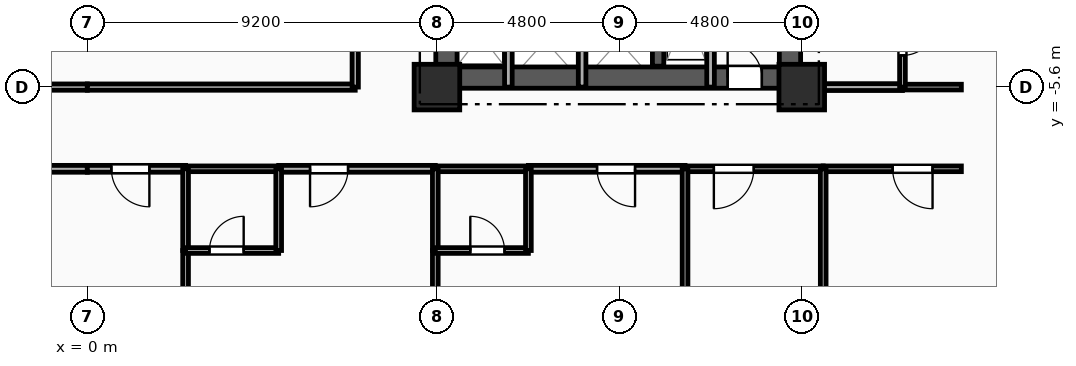
"""IFC4 building model, lengths in metres.
Left out: names, types, materials, properties, quantities, classifications, styles, units other than length and angle.
Written with IfcOpenShell. Run it as: python <this file> out.ifc"""

import sys

from ifc_helpers import new_model, si_unit, direction, frame, frame_2d, origin, origin_2d, place, context, subcontext, project, spatial, rectangle, extrude, element, fill, save


model = new_model("IFC4")
c1 = context("Model", 3, precision=1e-05, world=origin(), true_north=direction((0.0, 1.0)))
c2 = subcontext(c1, "Body", "Model", "MODEL_VIEW")
j1 = project(units=[si_unit("LENGTHUNIT", "METRE"), si_unit("PLANEANGLEUNIT", "RADIAN")], contexts=[c1])
p1 = place(None, origin())
s1 = spatial("IfcSite", under=j1, at=p1, CompositionType="ELEMENT")
p2 = place(p1, origin())
s2 = spatial("IfcBuilding", under=s1, at=p2, CompositionType="ELEMENT")
p3 = place(p2, frame((0.0, 0.0, 60.5)))
s3 = spatial("IfcBuildingStorey", under=s2, at=p3, CompositionType="ELEMENT", Elevation=60.5)
for number, where, z_axis, x_axis in (
    (1, (9.2, -5.6, 0.0), (0.0, 0.0, 1.0), (1.0, 0.0, 0.0)),
    (2, (18.8, -5.6, 0.0), (0.0, 0.0, 1.0), (1.0, 0.0, 0.0)),
):
    element("IfcColumn", number, at=place(p3, frame(where, z_axis=z_axis, x_axis=x_axis)), inside=s3, PredefinedType="COLUMN", context=c2, shape_type="SweptSolid", body=[
        extrude(rectangle(XDim=1.2, YDim=1.2, at=origin_2d()), origin(), (0.0, 0.0, 1.0), 3.35),
    ])
p4 = place(p3, frame((9.2, -5.35, 0.0), z_axis=(0.0, 0.0, 1.0), x_axis=(1.0, 0.0, 0.0)))
e3 = element("IfcWall", 3, at=p4, inside=s3, PredefinedType="SHEAR", context=c2, shape_type="SweptSolid", body=[
    extrude(rectangle(XDim=9.6, YDim=0.56, at=frame_2d((4.8, 0.0))), origin(), (0.0, 0.0, 1.0), 3.035),
])
p5 = place(p4, frame((7.65, 0.0, 0.0)))
e4 = element("IfcOpeningElement", 4, at=p5, cuts=e3, PredefinedType="OPENING", context=c2, shape_type="SweptSolid", body=[
    extrude(rectangle(XDim=0.9, YDim=2.1, at=frame_2d((0.45, 1.05))), frame((0.0, 0.29, 0.0), z_axis=(0.0, -1.0, 0.0), x_axis=(1.0, 0.0, 0.0)), (0.0, 0.0, 1.0), 0.58),
])
p6 = place(p3, frame((9.45, -5.05, 0.0), z_axis=(0.0, 0.0, 1.0), x_axis=(0.0, 1.0, 0.0)))
e5 = element("IfcWall", 5, at=p6, inside=s3, PredefinedType="SHEAR", context=c2, shape_type="SweptSolid", body=[
    extrude(rectangle(XDim=10.1, YDim=0.56, at=frame_2d((5.05, 0.0))), origin(), (0.0, 0.0, 1.0), 3.035),
])
p7 = place(p6, frame((7.15, 0.0, 0.0)))
e6 = element("IfcOpeningElement", 6, at=p7, cuts=e5, PredefinedType="OPENING", context=c2, shape_type="SweptSolid", body=[
    extrude(rectangle(XDim=0.9, YDim=2.1, at=frame_2d((0.45, 1.05))), frame((0.0, 0.29, 0.0), z_axis=(0.0, -1.0, 0.0), x_axis=(1.0, 0.0, 0.0)), (0.0, 0.0, 1.0), 0.58),
])
p8 = place(p6, frame((2.4, 0.0, 0.0)))
e7 = element("IfcOpeningElement", 7, at=p8, cuts=e5, PredefinedType="OPENING", context=c2, shape_type="SweptSolid", body=[
    extrude(rectangle(XDim=1.2, YDim=2.15, at=frame_2d((0.6, 1.075))), frame((0.0, 0.29, 0.0), z_axis=(0.0, -1.0, 0.0), x_axis=(1.0, 0.0, 0.0)), (0.0, 0.0, 1.0), 0.58),
])
p9 = place(p3, frame((18.49, -5.05, 0.0), z_axis=(0.0, 0.0, 1.0), x_axis=(0.0, 1.0, 0.0)))
e8 = element("IfcWall", 8, at=p9, inside=s3, PredefinedType="SHEAR", context=c2, shape_type="SweptSolid", body=[
    extrude(rectangle(XDim=10.1, YDim=0.56, at=frame_2d((5.05, 0.0))), origin(), (0.0, 0.0, 1.0), 3.035),
])
p10 = place(p3, frame((15.02, -5.05, 0.0), z_axis=(0.0, 0.0, 1.0), x_axis=(0.0, 1.0, 0.0)))
e9 = element("IfcWall", 9, at=p10, inside=s3, PredefinedType="SHEAR", context=c2, shape_type="SweptSolid", body=[
    extrude(rectangle(XDim=10.1, YDim=0.3, at=frame_2d((5.05, 0.0))), origin(), (0.0, 0.0, 1.0), 3.035),
])
p11 = place(p3, frame((16.4, -2.11, 0.0), z_axis=(0.0, 0.0, 1.0), x_axis=(0.0, -1.0, 0.0)))
e10 = element("IfcWall", 10, at=p11, inside=s3, PredefinedType="PARTITIONING", context=c2, shape_type="SweptSolid", body=[
    extrude(rectangle(XDim=3.49, YDim=0.2, at=frame_2d((1.745, 0.0))), origin(), (0.0, 0.0, 1.0), 3.035),
])
for number, where, z_axis, x_axis in (
    (11, (11.08, -5.6, 0.0), (0.0, 0.0, 1.0), (0.0, 1.0, 0.0)),
    (12, (13.02, -5.6, 0.0), (0.0, 0.0, 1.0), (0.0, 1.0, 0.0)),
):
    element("IfcWall", number, at=place(p3, frame(where, z_axis=z_axis, x_axis=x_axis)), inside=s3, PredefinedType="PARTITIONING", context=c2, shape_type="SweptSolid", body=[
        extrude(rectangle(XDim=2.25, YDim=0.2, at=frame_2d((1.125, 0.0))), origin(), (0.0, 0.0, 1.0), 3.035),
    ])
p12 = place(p3, frame((0.0, -7.75, 0.0), z_axis=(0.0, 0.0, 1.0), x_axis=(-1.0, 0.0, 0.0)))
e13 = element("IfcWall", 13, at=p12, inside=s3, PredefinedType="PARTITIONING", context=c2, shape_type="SweptSolid", body=[
    extrude(rectangle(XDim=1.536, YDim=0.18, at=frame_2d((0.768, 0.0))), origin(), (0.0, 0.0, 1.0), 3.035),
])
p13 = place(p3, frame((-7.05, -5.6, 0.0), z_axis=(0.0, 0.0, 1.0), x_axis=(1.0, 0.0, 0.0)))
e14 = element("IfcWall", 14, at=p13, inside=s3, PredefinedType="PARTITIONING", context=c2, shape_type="SweptSolid", body=[
    extrude(rectangle(XDim=7.05, YDim=0.165, at=frame_2d((3.525, 0.0))), origin(), (0.0, 0.0, 1.0), 2.52),
])
p14 = place(p13, frame((4.728, 0.0, 0.0)))
e15 = element("IfcOpeningElement", 15, at=p14, cuts=e14, PredefinedType="OPENING", context=c2, shape_type="SweptSolid", body=[
    extrude(rectangle(XDim=1.15, YDim=2.15, at=frame_2d((0.575, 1.075))), frame((0.0, 0.093, 0.0), z_axis=(0.0, -1.0, 0.0), x_axis=(1.0, 0.0, 0.0)), (0.0, 0.0, 1.0), 0.185),
])
p15 = place(p3, frame((18.8, -5.6, 0.0), z_axis=(0.0, 0.0, 1.0), x_axis=(1.0, 0.0, 0.0)))
e16 = element("IfcWall", 16, at=p15, inside=s3, PredefinedType="PARTITIONING", context=c2, shape_type="SweptSolid", body=[
    extrude(rectangle(XDim=2.65, YDim=0.18, at=frame_2d((1.325, 0.0))), origin(), (0.0, 0.0, 1.0), 3.035),
])
p16 = place(p3, frame((21.45, -5.6, 0.0), z_axis=(0.0, 0.0, 1.0), x_axis=(1.0, 0.0, 0.0)))
e17 = element("IfcWall", 17, at=p16, inside=s3, PredefinedType="PLUMBINGWALL", context=c2, shape_type="SweptSolid", body=[
    extrude(rectangle(XDim=1.55, YDim=0.15, at=frame_2d((0.775, 0.0))), origin(), (0.0, 0.0, 1.0), 3.035),
])
p17 = place(p3, frame((2.586, -7.75, 0.0), z_axis=(0.0, 0.0, 1.0), x_axis=(-1.0, 0.0, 0.0)))
e18 = element("IfcWall", 18, at=p17, inside=s3, PredefinedType="PARTITIONING", context=c2, shape_type="SweptSolid", body=[
    extrude(rectangle(XDim=2.586, YDim=0.18, at=frame_2d((1.293, 0.0))), origin(), (0.0, 0.0, 1.0), 3.035),
])
p18 = place(p17, frame((0.953, 0.0, 0.0)))
e19 = element("IfcOpeningElement", 19, at=p18, cuts=e18, PredefinedType="OPENING", context=c2, shape_type="SweptSolid", body=[
    extrude(rectangle(XDim=1.0, YDim=2.15, at=frame_2d((0.5, 1.075))), frame((0.0, 0.1, 0.0), z_axis=(0.0, -1.0, 0.0), x_axis=(1.0, 0.0, 0.0)), (0.0, 0.0, 1.0), 0.2),
])
p19 = place(p3, frame((9.157, -7.75, 0.0), z_axis=(0.0, 0.0, 1.0), x_axis=(-1.0, 0.0, 0.0)))
e20 = element("IfcWall", 20, at=p19, inside=s3, PredefinedType="PARTITIONING", context=c2, shape_type="SweptSolid", body=[
    extrude(rectangle(XDim=4.121, YDim=0.18, at=frame_2d((2.061, 0.0))), origin(), (0.0, 0.0, 1.0), 3.035),
])
p20 = place(p19, frame((2.296, 0.0, 0.0)))
e21 = element("IfcOpeningElement", 21, at=p20, cuts=e20, PredefinedType="OPENING", context=c2, shape_type="SweptSolid", body=[
    extrude(rectangle(XDim=1.0, YDim=2.15, at=frame_2d((0.5, 1.075))), frame((0.0, 0.1, 0.0), z_axis=(0.0, -1.0, 0.0), x_axis=(1.0, 0.0, 0.0)), (0.0, 0.0, 1.0), 0.2),
])
p21 = place(p3, frame((5.036, -7.75, 0.0), z_axis=(0.0, 0.0, 1.0), x_axis=(-1.0, 0.0, 0.0)))
e22 = element("IfcWall", 22, at=p21, inside=s3, PredefinedType="PLUMBINGWALL", context=c2, shape_type="SweptSolid", body=[
    extrude(rectangle(XDim=2.45, YDim=0.15, at=frame_2d((1.225, 0.0))), origin(), (0.0, 0.0, 1.0), 3.035),
])
p22 = place(p3, frame((15.729, -7.75, 0.0), z_axis=(0.0, 0.0, 1.0), x_axis=(-1.0, 0.0, 0.0)))
e23 = element("IfcWall", 23, at=p22, inside=s3, PredefinedType="PARTITIONING", context=c2, shape_type="SweptSolid", body=[
    extrude(rectangle(XDim=4.122, YDim=0.18, at=frame_2d((2.061, 0.0))), origin(), (0.0, 0.0, 1.0), 3.035),
])
p23 = place(p22, frame((1.316, 0.0, 0.0)))
e24 = element("IfcOpeningElement", 24, at=p23, cuts=e23, PredefinedType="OPENING", context=c2, shape_type="SweptSolid", body=[
    extrude(rectangle(XDim=1.0, YDim=2.15, at=frame_2d((0.5, 1.075))), frame((0.0, 0.1, 0.0), z_axis=(0.0, -1.0, 0.0), x_axis=(1.0, 0.0, 0.0)), (0.0, 0.0, 1.0), 0.2),
])
p24 = place(p3, frame((11.607, -7.75, 0.0), z_axis=(0.0, 0.0, 1.0), x_axis=(-1.0, 0.0, 0.0)))
e25 = element("IfcWall", 25, at=p24, inside=s3, PredefinedType="PLUMBINGWALL", context=c2, shape_type="SweptSolid", body=[
    extrude(rectangle(XDim=2.45, YDim=0.15, at=frame_2d((1.225, 0.0))), origin(), (0.0, 0.0, 1.0), 3.035),
])
p25 = place(p3, frame((19.365, -7.75, 0.0), z_axis=(0.0, 0.0, 1.0), x_axis=(-1.0, 0.0, 0.0)))
e26 = element("IfcWall", 26, at=p25, inside=s3, PredefinedType="PARTITIONING", context=c2, shape_type="SweptSolid", body=[
    extrude(rectangle(XDim=3.635, YDim=0.15, at=frame_2d((1.818, 0.0))), origin(), (0.0, 0.0, 1.0), 3.035),
])
p26 = place(p25, frame((1.827, 0.0, 0.0)))
e27 = element("IfcOpeningElement", 27, at=p26, cuts=e26, PredefinedType="OPENING", context=c2, shape_type="SweptSolid", body=[
    extrude(rectangle(XDim=1.05, YDim=2.15, at=frame_2d((0.525, 1.075))), frame((0.0, 0.085, 0.0), z_axis=(0.0, -1.0, 0.0), x_axis=(1.0, 0.0, 0.0)), (0.0, 0.0, 1.0), 0.17),
])
p27 = place(p3, frame((23.0, -7.75, 0.0), z_axis=(0.0, 0.0, 1.0), x_axis=(-1.0, 0.0, 0.0)))
e28 = element("IfcWall", 28, at=p27, inside=s3, PredefinedType="PARTITIONING", context=c2, shape_type="SweptSolid", body=[
    extrude(rectangle(XDim=3.635, YDim=0.15, at=frame_2d((1.818, 0.0))), origin(), (0.0, 0.0, 1.0), 3.035),
])
p28 = place(p27, frame((0.758, 0.0, 0.0)))
e29 = element("IfcOpeningElement", 29, at=p28, cuts=e28, PredefinedType="OPENING", context=c2, shape_type="SweptSolid", body=[
    extrude(rectangle(XDim=1.05, YDim=2.15, at=frame_2d((0.525, 1.075))), frame((0.0, 0.085, 0.0), z_axis=(0.0, -1.0, 0.0), x_axis=(1.0, 0.0, 0.0)), (0.0, 0.0, 1.0), 0.17),
])
p29 = place(p3, frame((0.0, -5.6, 0.0), z_axis=(0.0, 0.0, 1.0), x_axis=(1.0, 0.0, 0.0)))
e30 = element("IfcWall", 30, at=p29, inside=s3, PredefinedType="PARTITIONING", context=c2, shape_type="SweptSolid", body=[
    extrude(rectangle(XDim=7.05, YDim=0.165, at=frame_2d((3.525, 0.0))), origin(), (0.0, 0.0, 1.0), 2.52),
])
p30 = place(p3, frame((7.05, -5.6, 0.0), z_axis=(0.0, 0.0, 1.0), x_axis=(0.0, 1.0, 0.0)))
e31 = element("IfcWall", 31, at=p30, inside=s3, PredefinedType="PARTITIONING", context=c2, shape_type="SweptSolid", body=[
    extrude(rectangle(XDim=7.05, YDim=0.165, at=frame_2d((3.525, 0.0))), origin(), (0.0, 0.0, 1.0), 3.035),
])
p31 = place(p3, frame((21.45, -3.25, 0.0), z_axis=(0.0, 0.0, 1.0), x_axis=(0.0, -1.0, 0.0)))
e32 = element("IfcWall", 32, at=p31, inside=s3, PredefinedType="PLUMBINGWALL", context=c2, shape_type="SweptSolid", body=[
    extrude(rectangle(XDim=2.35, YDim=0.15, at=frame_2d((1.175, 0.0))), origin(), (0.0, 0.0, 1.0), 3.035),
])
p32 = place(p31, frame((0.616, 0.0, 0.0)))
e33 = element("IfcOpeningElement", 33, at=p32, cuts=e32, PredefinedType="OPENING", context=c2, shape_type="SweptSolid", body=[
    extrude(rectangle(XDim=0.9, YDim=2.1, at=frame_2d((0.45, 1.05))), frame((0.0, 0.085, 0.0), z_axis=(0.0, -1.0, 0.0), x_axis=(1.0, 0.0, 0.0)), (0.0, 0.0, 1.0), 0.17),
])
p33 = place(p3, frame((2.586, -9.9, 0.0), z_axis=(0.0, 0.0, 1.0), x_axis=(0.0, -1.0, 0.0)))
e34 = element("IfcWall", 34, at=p33, inside=s3, PredefinedType="PARTITIONING", context=c2, shape_type="SweptSolid", body=[
    extrude(rectangle(XDim=9.5, YDim=0.15, at=frame_2d((4.75, 0.0))), origin(), (0.0, 0.0, 1.0), 3.035),
])
p34 = place(p3, frame((2.586, -7.75, 0.0), z_axis=(0.0, 0.0, 1.0), x_axis=(0.0, -1.0, 0.0)))
e35 = element("IfcWall", 35, at=p34, inside=s3, PredefinedType="PLUMBINGWALL", context=c2, shape_type="SweptSolid", body=[
    extrude(rectangle(XDim=2.15, YDim=0.15, at=frame_2d((1.075, 0.0))), origin(), (0.0, 0.0, 1.0), 3.035),
])
p35 = place(p3, frame((2.586, -9.9, 0.0), z_axis=(0.0, 0.0, 1.0), x_axis=(1.0, 0.0, 0.0)))
e36 = element("IfcWall", 36, at=p35, inside=s3, PredefinedType="PLUMBINGWALL", context=c2, shape_type="SweptSolid", body=[
    extrude(rectangle(XDim=2.45, YDim=0.15, at=frame_2d((1.225, 0.0))), origin(), (0.0, 0.0, 1.0), 3.035),
])
p36 = place(p35, frame((0.629, 0.0, 0.0)))
e37 = element("IfcOpeningElement", 37, at=p36, cuts=e36, PredefinedType="OPENING", context=c2, shape_type="SweptSolid", body=[
    extrude(rectangle(XDim=0.9, YDim=2.1, at=frame_2d((0.45, 1.05))), frame((0.0, 0.085, 0.0), z_axis=(0.0, -1.0, 0.0), x_axis=(1.0, 0.0, 0.0)), (0.0, 0.0, 1.0), 0.17),
])
p37 = place(p3, frame((5.036, -9.9, 0.0), z_axis=(0.0, 0.0, 1.0), x_axis=(0.0, 1.0, 0.0)))
e38 = element("IfcWall", 38, at=p37, inside=s3, PredefinedType="PLUMBINGWALL", context=c2, shape_type="SweptSolid", body=[
    extrude(rectangle(XDim=2.15, YDim=0.15, at=frame_2d((1.075, 0.0))), origin(), (0.0, 0.0, 1.0), 3.035),
])
p38 = place(p3, frame((9.157, -9.9, 0.0), z_axis=(0.0, 0.0, 1.0), x_axis=(0.0, -1.0, 0.0)))
e39 = element("IfcWall", 39, at=p38, inside=s3, PredefinedType="PARTITIONING", context=c2, shape_type="SweptSolid", body=[
    extrude(rectangle(XDim=9.5, YDim=0.15, at=frame_2d((4.75, 0.0))), origin(), (0.0, 0.0, 1.0), 2.52),
])
p39 = place(p3, frame((9.157, -7.75, 0.0), z_axis=(0.0, 0.0, 1.0), x_axis=(0.0, -1.0, 0.0)))
e40 = element("IfcWall", 40, at=p39, inside=s3, PredefinedType="PLUMBINGWALL", context=c2, shape_type="SweptSolid", body=[
    extrude(rectangle(XDim=2.15, YDim=0.15, at=frame_2d((1.075, 0.0))), origin(), (0.0, 0.0, 1.0), 2.52),
])
p40 = place(p3, frame((9.157, -9.9, 0.0), z_axis=(0.0, 0.0, 1.0), x_axis=(1.0, 0.0, 0.0)))
e41 = element("IfcWall", 41, at=p40, inside=s3, PredefinedType="PLUMBINGWALL", context=c2, shape_type="SweptSolid", body=[
    extrude(rectangle(XDim=2.45, YDim=0.15, at=frame_2d((1.225, 0.0))), origin(), (0.0, 0.0, 1.0), 3.035),
])
p41 = place(p40, frame((0.921, 0.0, 0.0)))
e42 = element("IfcOpeningElement", 42, at=p41, cuts=e41, PredefinedType="OPENING", context=c2, shape_type="SweptSolid", body=[
    extrude(rectangle(XDim=0.9, YDim=2.1, at=frame_2d((0.45, 1.05))), frame((0.0, 0.085, 0.0), z_axis=(0.0, -1.0, 0.0), x_axis=(1.0, 0.0, 0.0)), (0.0, 0.0, 1.0), 0.17),
])
p42 = place(p3, frame((11.607, -9.9, 0.0), z_axis=(0.0, 0.0, 1.0), x_axis=(0.0, 1.0, 0.0)))
e43 = element("IfcWall", 43, at=p42, inside=s3, PredefinedType="PLUMBINGWALL", context=c2, shape_type="SweptSolid", body=[
    extrude(rectangle(XDim=2.15, YDim=0.15, at=frame_2d((1.075, 0.0))), origin(), (0.0, 0.0, 1.0), 3.035),
])
for number, where, z_axis, x_axis in (
    (44, (15.729, -7.75, 0.0), (0.0, 0.0, 1.0), (0.0, -1.0, 0.0)),
    (45, (19.365, -7.75, 0.0), (0.0, 0.0, 1.0), (0.0, -1.0, 0.0)),
):
    element("IfcWall", number, at=place(p3, frame(where, z_axis=z_axis, x_axis=x_axis)), inside=s3, PredefinedType="PARTITIONING", context=c2, shape_type="SweptSolid", body=[
        extrude(rectangle(XDim=11.65, YDim=0.15, at=frame_2d((5.825, 0.0))), origin(), (0.0, 0.0, 1.0), 3.035),
    ])
p43 = place(p5, origin())
e46 = element("IfcDoor", 46, at=p43, inside=s3, OperationType="SINGLE_SWING_LEFT", PredefinedType="DOOR", context=c2, shape_type="SweptSolid", body=[
    extrude(rectangle(XDim=0.9, YDim=2.1, at=frame_2d((0.45, 1.05))), frame((0.0, 0.025, 0.0), z_axis=(0.0, -1.0, 0.0), x_axis=(1.0, 0.0, 0.0)), (0.0, 0.0, 1.0), 0.05),
])
fill(e4, e46)
p44 = place(p18, origin())
e47 = element("IfcDoor", 47, at=p44, inside=s3, OperationType="SINGLE_SWING_LEFT", PredefinedType="DOOR", context=c2, shape_type="SweptSolid", body=[
    extrude(rectangle(XDim=1.0, YDim=2.15, at=frame_2d((0.5, 1.075))), frame((0.0, 0.025, 0.0), z_axis=(0.0, -1.0, 0.0), x_axis=(1.0, 0.0, 0.0)), (0.0, 0.0, 1.0), 0.05),
])
fill(e19, e47)
p45 = place(p20, origin())
e48 = element("IfcDoor", 48, at=p45, inside=s3, OperationType="SINGLE_SWING_RIGHT", PredefinedType="DOOR", context=c2, shape_type="SweptSolid", body=[
    extrude(rectangle(XDim=1.0, YDim=2.15, at=frame_2d((0.5, 1.075))), frame((0.0, 0.025, 0.0), z_axis=(0.0, -1.0, 0.0), x_axis=(1.0, 0.0, 0.0)), (0.0, 0.0, 1.0), 0.05),
])
fill(e21, e48)
p46 = place(p23, origin())
e49 = element("IfcDoor", 49, at=p46, inside=s3, OperationType="SINGLE_SWING_LEFT", PredefinedType="DOOR", context=c2, shape_type="SweptSolid", body=[
    extrude(rectangle(XDim=1.0, YDim=2.15, at=frame_2d((0.5, 1.075))), frame((0.0, 0.025, 0.0), z_axis=(0.0, -1.0, 0.0), x_axis=(1.0, 0.0, 0.0)), (0.0, 0.0, 1.0), 0.05),
])
fill(e24, e49)
p47 = place(p26, origin())
e50 = element("IfcDoor", 50, at=p47, inside=s3, OperationType="SINGLE_SWING_RIGHT", PredefinedType="DOOR", context=c2, shape_type="SweptSolid", body=[
    extrude(rectangle(XDim=1.05, YDim=2.15, at=frame_2d((0.525, 1.075))), frame((0.0, 0.025, 0.0), z_axis=(0.0, -1.0, 0.0), x_axis=(1.0, 0.0, 0.0)), (0.0, 0.0, 1.0), 0.05),
])
fill(e27, e50)
p48 = place(p28, origin())
e51 = element("IfcDoor", 51, at=p48, inside=s3, OperationType="SINGLE_SWING_LEFT", PredefinedType="DOOR", context=c2, shape_type="SweptSolid", body=[
    extrude(rectangle(XDim=1.05, YDim=2.15, at=frame_2d((0.525, 1.075))), frame((0.0, 0.025, 0.0), z_axis=(0.0, -1.0, 0.0), x_axis=(1.0, 0.0, 0.0)), (0.0, 0.0, 1.0), 0.05),
])
fill(e29, e51)
p49 = place(p32, origin())
e52 = element("IfcDoor", 52, at=p49, inside=s3, OperationType="SINGLE_SWING_LEFT", PredefinedType="DOOR", context=c2, shape_type="SweptSolid", body=[
    extrude(rectangle(XDim=0.9, YDim=2.1, at=frame_2d((0.45, 1.05))), frame((0.0, 0.025, 0.0), z_axis=(0.0, -1.0, 0.0), x_axis=(1.0, 0.0, 0.0)), (0.0, 0.0, 1.0), 0.05),
])
fill(e33, e52)
p50 = place(p36, origin())
e53 = element("IfcDoor", 53, at=p50, inside=s3, OperationType="SINGLE_SWING_RIGHT", PredefinedType="DOOR", context=c2, shape_type="SweptSolid", body=[
    extrude(rectangle(XDim=0.9, YDim=2.1, at=frame_2d((0.45, 1.05))), frame((0.0, 0.025, 0.0), z_axis=(0.0, -1.0, 0.0), x_axis=(1.0, 0.0, 0.0)), (0.0, 0.0, 1.0), 0.05),
])
fill(e37, e53)
p51 = place(p41, origin())
e54 = element("IfcDoor", 54, at=p51, inside=s3, OperationType="SINGLE_SWING_LEFT", PredefinedType="DOOR", context=c2, shape_type="SweptSolid", body=[
    extrude(rectangle(XDim=0.9, YDim=2.1, at=frame_2d((0.45, 1.05))), frame((0.0, 0.025, 0.0), z_axis=(0.0, -1.0, 0.0), x_axis=(1.0, 0.0, 0.0)), (0.0, 0.0, 1.0), 0.05),
])
fill(e42, e54)
save(model, sys.argv[1])
